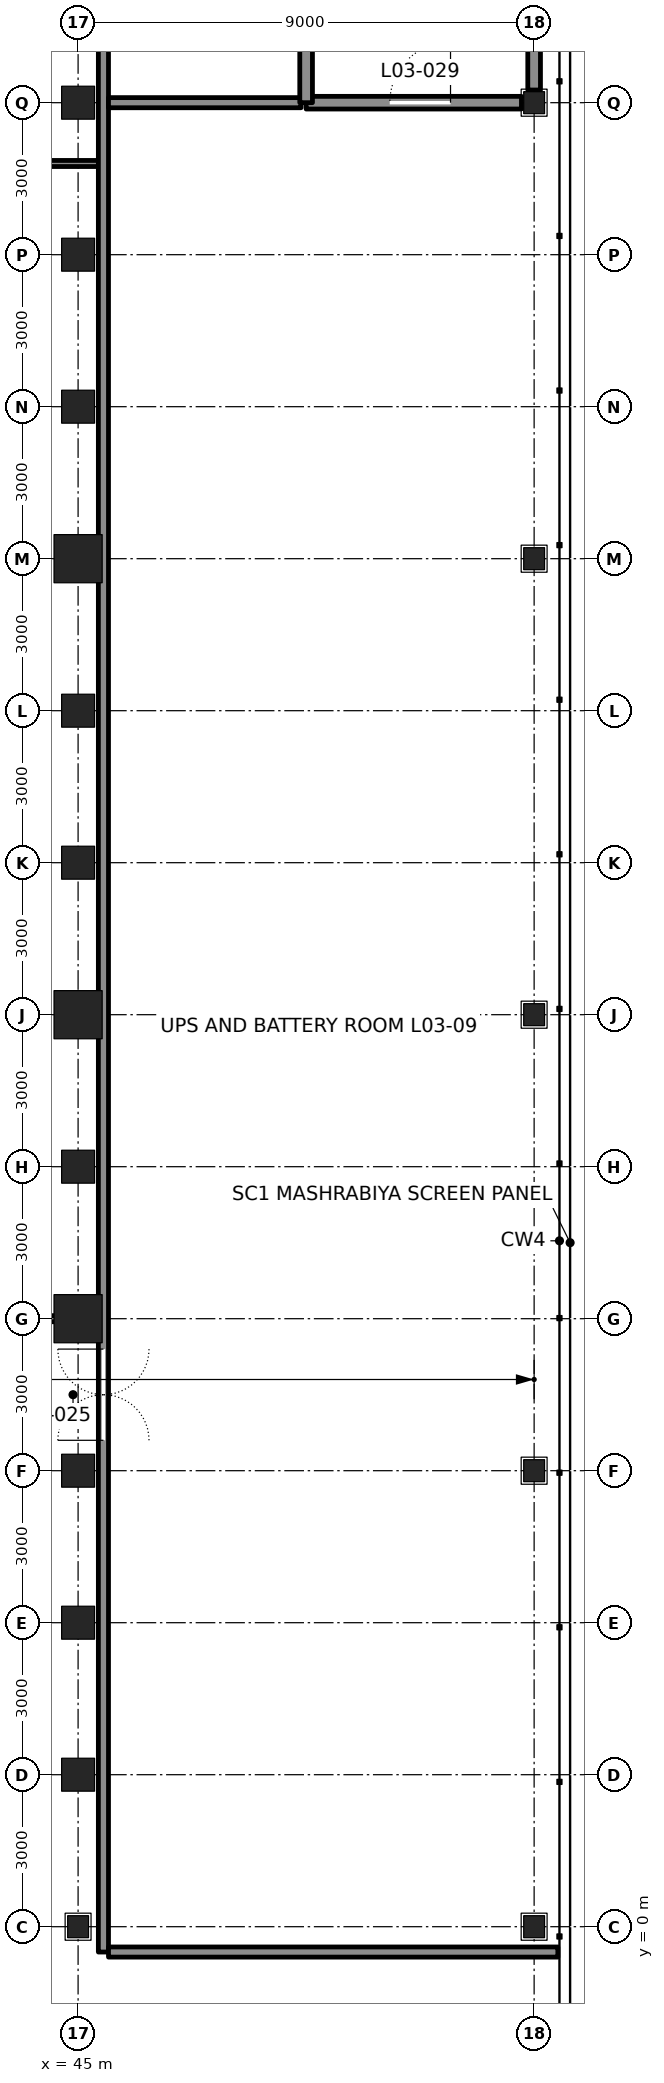
"""IFC4 building model, lengths in metres.
Left out: names, types, materials, properties, quantities, classifications, styles, units other than length and angle.
Written with IfcOpenShell. Run it as: python <this file> out.ifc"""

import sys

from ifc_helpers import new_model, si_unit, direction, frame, frame_2d, origin, origin_2d, place, context, subcontext, project, spatial, rectangle, hollow_rectangle, i_section, extrude, element, fill, save


model = new_model("IFC4")
c1 = context("Model", 3, precision=1e-05, world=origin(), true_north=direction((0.0, 1.0)))
c2 = subcontext(c1, "Body", "Model", "MODEL_VIEW")
j1 = project(units=[si_unit("LENGTHUNIT", "METRE"), si_unit("PLANEANGLEUNIT", "RADIAN")], contexts=[c1])
p1 = place(None, origin())
s1 = spatial("IfcSite", under=j1, at=p1, CompositionType="ELEMENT")
p2 = place(p1, origin())
s2 = spatial("IfcBuilding", under=s1, at=p2, CompositionType="ELEMENT")
p3 = place(p2, frame((0.0, 0.0, 19.5)))
s3 = spatial("IfcBuildingStorey", under=s2, at=p3, CompositionType="ELEMENT", Elevation=19.5)
for number, where, z_axis, x_axis in (
    (1, (45.0, 3.0, 0.0), (0.0, 0.0, 1.0), (1.0, 0.0, 0.0)),
    (2, (45.0, 6.0, 0.0), (0.0, 0.0, 1.0), (1.0, 0.0, 0.0)),
    (3, (45.0, 9.0, 0.0), (0.0, 0.0, 1.0), (1.0, 0.0, 0.0)),
):
    element("IfcColumn", number, at=place(p3, frame(where, z_axis=z_axis, x_axis=x_axis)), inside=s3, PredefinedType="COLUMN", context=c2, shape_type="SweptSolid", body=[
        extrude(hollow_rectangle(XDim=0.65, YDim=0.65, WallThickness=0.065, at=origin_2d()), origin(), (0.0, 0.0, 1.0), 4.8),
    ])
p4 = place(p3, frame((45.0, 12.0, 0.0), z_axis=(0.0, 0.0, 1.0), x_axis=(1.0, 0.0, 0.0)))
e4 = element("IfcColumn", 4, at=p4, inside=s3, PredefinedType="COLUMN", context=c2, shape_type="SweptSolid", body=[
    extrude(hollow_rectangle(XDim=0.95, YDim=0.95, WallThickness=0.11, at=origin_2d()), origin(), (0.0, 0.0, 1.0), 4.8),
])
p5 = place(p3, frame((45.0, 15.0, 0.0), z_axis=(0.0, 0.0, 1.0), x_axis=(1.0, 0.0, 0.0)))
e5 = element("IfcColumn", 5, at=p5, inside=s3, PredefinedType="COLUMN", context=c2, shape_type="SweptSolid", body=[
    extrude(hollow_rectangle(XDim=0.65, YDim=0.65, WallThickness=0.065, at=origin_2d()), origin(), (0.0, 0.0, 1.0), 4.8),
])
p6 = place(p3, frame((45.0, 18.0, 0.0), z_axis=(0.0, 0.0, 1.0), x_axis=(1.0, 0.0, 0.0)))
e6 = element("IfcColumn", 6, at=p6, inside=s3, PredefinedType="COLUMN", context=c2, shape_type="SweptSolid", body=[
    extrude(hollow_rectangle(XDim=0.95, YDim=0.95, WallThickness=0.11, at=origin_2d()), origin(), (0.0, 0.0, 1.0), 4.8),
])
for number, where, z_axis, x_axis in (
    (7, (45.0, 21.0, 0.0), (0.0, 0.0, 1.0), (1.0, 0.0, 0.0)),
    (8, (45.0, 24.0, 0.0), (0.0, 0.0, 1.0), (1.0, 0.0, 0.0)),
):
    element("IfcColumn", number, at=place(p3, frame(where, z_axis=z_axis, x_axis=x_axis)), inside=s3, PredefinedType="COLUMN", context=c2, shape_type="SweptSolid", body=[
        extrude(hollow_rectangle(XDim=0.65, YDim=0.65, WallThickness=0.065, at=origin_2d()), origin(), (0.0, 0.0, 1.0), 4.8),
    ])
p7 = place(p3, frame((45.0, 27.0, 0.0), z_axis=(0.0, 0.0, 1.0), x_axis=(1.0, 0.0, 0.0)))
e9 = element("IfcColumn", 9, at=p7, inside=s3, PredefinedType="COLUMN", context=c2, shape_type="SweptSolid", body=[
    extrude(hollow_rectangle(XDim=0.95, YDim=0.95, WallThickness=0.11, at=origin_2d()), origin(), (0.0, 0.0, 1.0), 4.8),
])
for number, where, z_axis, x_axis in (
    (10, (45.0, 30.0, 0.0), (0.0, 0.0, 1.0), (1.0, 0.0, 0.0)),
    (11, (45.0, 33.0, 0.0), (0.0, 0.0, 1.0), (1.0, 0.0, 0.0)),
    (12, (45.0, 36.0, 0.0), (0.0, 0.0, 1.0), (1.0, 0.0, 0.0)),
):
    element("IfcColumn", number, at=place(p3, frame(where, z_axis=z_axis, x_axis=x_axis)), inside=s3, PredefinedType="COLUMN", context=c2, shape_type="SweptSolid", body=[
        extrude(hollow_rectangle(XDim=0.65, YDim=0.65, WallThickness=0.065, at=origin_2d()), origin(), (0.0, 0.0, 1.0), 4.8),
    ])
for number, where, z_axis, x_axis in (
    (13, (45.0, 0.0, 0.0), (0.0, 0.0, 1.0), (1.0, 0.0, 0.0)),
    (14, (54.0, 0.0, 0.0), (0.0, 0.0, 1.0), (1.0, 0.0, 0.0)),
    (15, (54.0, 9.0, 0.0), (0.0, 0.0, 1.0), (1.0, 0.0, 0.0)),
    (16, (54.0, 18.0, 0.0), (0.0, 0.0, 1.0), (1.0, 0.0, 0.0)),
    (17, (54.0, 27.0, 0.0), (0.0, 0.0, 1.0), (1.0, 0.0, 0.0)),
    (18, (54.0, 36.0, 0.0), (0.0, 0.0, 1.0), (1.0, 0.0, 0.0)),
):
    element("IfcColumn", number, at=place(p3, frame(where, z_axis=z_axis, x_axis=x_axis)), inside=s3, PredefinedType="COLUMN", context=c2, shape_type="SweptSolid", body=[
        extrude(i_section(OverallWidth=0.411, OverallDepth=0.434, WebThickness=0.036, FlangeThickness=0.057, at=origin_2d()), origin(), (0.0, 0.0, 1.0), 4.8),
    ])
p8 = place(p3, frame((22.5, 34.8, 0.0), z_axis=(0.0, 0.0, 1.0), x_axis=(1.0, 0.0, 0.0)))
e19 = element("IfcWall", 19, at=p8, inside=s3, PredefinedType="PARTITIONING", context=c2, shape_type="SweptSolid", body=[
    extrude(rectangle(XDim=23.0, YDim=0.12, at=frame_2d((11.5, 0.0))), origin(), (0.0, 0.0, 1.0), 4.34),
])
p9 = place(p8, frame((11.0, 0.0, 0.0)))
e20 = element("IfcOpeningElement", 20, at=p9, cuts=e19, PredefinedType="OPENING", context=c2, shape_type="SweptSolid", body=[
    extrude(rectangle(XDim=1.0, YDim=2.4, at=frame_2d((0.5, 1.2))), frame((0.0, 0.07, 0.0), z_axis=(0.0, -1.0, 0.0), x_axis=(1.0, 0.0, 0.0)), (0.0, 0.0, 1.0), 0.14),
])
p10 = place(p3, frame((34.8, 12.0, 0.0), z_axis=(0.0, 0.0, 1.0), x_axis=(1.0, 0.0, 0.0)))
e21 = element("IfcWall", 21, at=p10, inside=s3, PredefinedType="PARTITIONING", context=c2, shape_type="SweptSolid", body=[
    extrude(rectangle(XDim=10.7, YDim=0.12, at=frame_2d((5.35, 0.0))), origin(), (0.0, 0.0, 1.0), 3.481),
])
p11 = place(p3, frame((45.5, -0.5, 0.0), z_axis=(0.0, 0.0, 1.0), x_axis=(0.0, 1.0, 0.0)))
e22 = element("IfcWall", 22, at=p11, inside=s3, PredefinedType="PARTITIONING", context=c2, shape_type="SweptSolid", body=[
    extrude(rectangle(XDim=46.018, YDim=0.2, at=frame_2d((23.009, 0.0))), origin(), (0.0, 0.0, 1.0), 4.64),
])
p12 = place(p11, frame((43.625, 0.0, 0.0)))
e23 = element("IfcOpeningElement", 23, at=p12, cuts=e22, PredefinedType="OPENING", context=c2, shape_type="SweptSolid", body=[
    extrude(rectangle(XDim=0.75, YDim=2.1, at=frame_2d((0.375, 1.05))), frame((0.0, 0.11, 0.0), z_axis=(0.0, -1.0, 0.0), x_axis=(1.0, 0.0, 0.0)), (0.0, 0.0, 1.0), 0.22),
])
p13 = place(p11, frame((10.1, 0.0, 0.0)))
e24 = element("IfcOpeningElement", 24, at=p13, cuts=e22, PredefinedType="OPENING", context=c2, shape_type="SweptSolid", body=[
    extrude(rectangle(XDim=1.8, YDim=2.4, at=frame_2d((0.9, 1.2))), frame((0.0, 0.11, 0.0), z_axis=(0.0, -1.0, 0.0), x_axis=(1.0, 0.0, 0.0)), (0.0, 0.0, 1.0), 0.22),
])
p14 = place(p3, frame((45.6, 36.0, 0.0), z_axis=(0.0, 0.0, 1.0), x_axis=(1.0, 0.0, 0.0)))
e25 = element("IfcWall", 25, at=p14, inside=s3, PredefinedType="PARTITIONING", context=c2, shape_type="SweptSolid", body=[
    extrude(rectangle(XDim=3.8, YDim=0.2, at=frame_2d((1.9, 0.0))), origin(), (0.0, 0.0, 1.0), 3.653),
])
p15 = place(p3, frame((45.6, -0.5, 0.0), z_axis=(0.0, 0.0, 1.0), x_axis=(1.0, 0.0, 0.0)))
e26 = element("IfcWall", 26, at=p15, inside=s3, PredefinedType="PARTITIONING", context=c2, shape_type="SweptSolid", body=[
    extrude(rectangle(XDim=8.868, YDim=0.2, at=frame_2d((4.434, 0.0))), origin(), (0.0, 0.0, 1.0), 4.64),
])
p16 = place(p3, frame((49.5, 36.0, 0.0), z_axis=(0.0, 0.0, 1.0), x_axis=(1.0, 0.0, 0.0)))
e27 = element("IfcWall", 27, at=p16, inside=s3, PredefinedType="SOLIDWALL", context=c2, shape_type="SweptSolid", body=[
    extrude(rectangle(XDim=4.25, YDim=0.25, at=frame_2d((2.125, 0.0))), origin(), (0.0, 0.0, 1.0), 3.653),
])
p17 = place(p16, frame((1.65, 0.0, 0.0)))
e28 = element("IfcOpeningElement", 28, at=p17, cuts=e27, PredefinedType="OPENING", context=c2, shape_type="SweptSolid", body=[
    extrude(rectangle(XDim=1.2, YDim=2.1, at=frame_2d((0.6, 1.05))), frame((0.0, 0.135, 0.0), z_axis=(0.0, -1.0, 0.0), x_axis=(1.0, 0.0, 0.0)), (0.0, 0.0, 1.0), 0.27),
])
p18 = place(p3, frame((54.0, 36.25, 0.0), z_axis=(0.0, 0.0, 1.0), x_axis=(0.0, 1.0, 0.0)))
e29 = element("IfcWall", 29, at=p18, inside=s3, PredefinedType="SOLIDWALL", context=c2, shape_type="SweptSolid", body=[
    extrude(rectangle(XDim=8.5, YDim=0.25, at=frame_2d((4.25, 0.0))), origin(), (0.0, 0.0, 1.0), 3.653),
])
p19 = place(p3, frame((49.5, 36.0, 0.0), z_axis=(0.0, 0.0, 1.0), x_axis=(0.0, 1.0, 0.0)))
e30 = element("IfcWall", 30, at=p19, inside=s3, PredefinedType="SOLIDWALL", context=c2, shape_type="SweptSolid", body=[
    extrude(rectangle(XDim=9.0, YDim=0.25, at=frame_2d((4.5, 0.0))), origin(), (0.0, 0.0, 1.0), 4.64),
])
p20 = place(p13, origin())
e31 = element("IfcDoor", 31, at=p20, inside=s3, OperationType="DOUBLE_DOOR_DOUBLE_SWING", PredefinedType="DOOR", context=c2, shape_type="SweptSolid", body=[
    extrude(rectangle(XDim=1.8, YDim=2.4, at=frame_2d((0.9, 1.2))), frame((0.0, 0.025, 0.0), z_axis=(0.0, -1.0, 0.0), x_axis=(1.0, 0.0, 0.0)), (0.0, 0.0, 1.0), 0.05),
])
fill(e24, e31)
p21 = place(p17, origin())
e32 = element("IfcDoor", 32, at=p21, inside=s3, OperationType="SINGLE_SWING_RIGHT", PredefinedType="DOOR", context=c2, shape_type="SweptSolid", body=[
    extrude(rectangle(XDim=1.2, YDim=2.1, at=frame_2d((0.6, 1.05))), frame((0.0, 0.025, 0.0), z_axis=(0.0, -1.0, 0.0), x_axis=(1.0, 0.0, 0.0)), (0.0, 0.0, 1.0), 0.05),
])
fill(e28, e32)
save(model, sys.argv[1])
